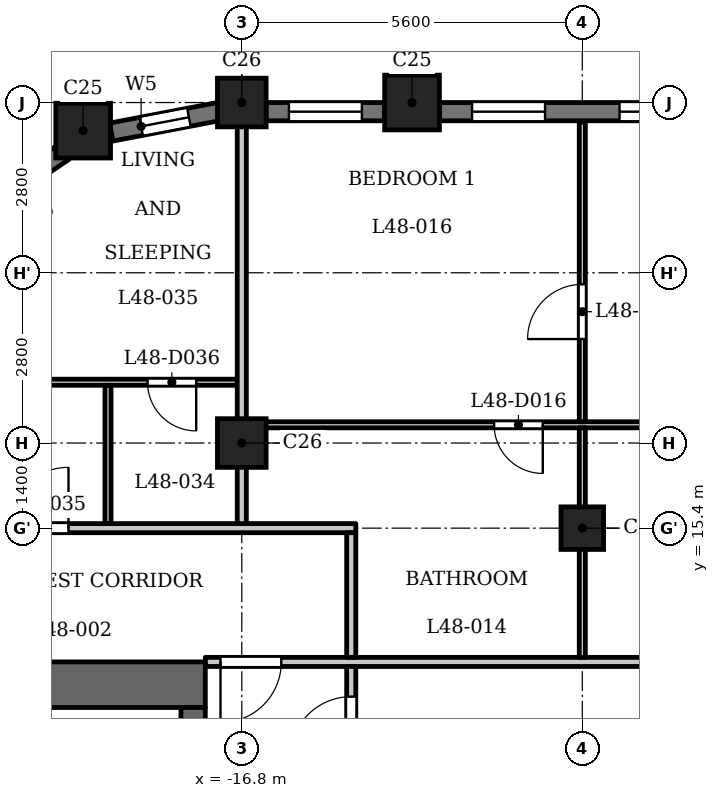
"""IFC4 building model, lengths in metres.
Left out: names, types, materials, properties, quantities, classifications, styles, units other than length and angle.
Written with IfcOpenShell. Run it as: python <this file> out.ifc"""

import sys

from ifc_helpers import new_model, si_unit, direction, frame, frame_2d, origin, origin_2d, place, context, subcontext, project, spatial, rectangle, extrude, element, fill, save


model = new_model("IFC4")
c1 = context("Model", 3, precision=1e-05, world=origin(), true_north=direction((0.0, 1.0)))
c2 = subcontext(c1, "Body", "Model", "MODEL_VIEW")
j1 = project(units=[si_unit("LENGTHUNIT", "METRE"), si_unit("PLANEANGLEUNIT", "RADIAN")], contexts=[c1])
p1 = place(None, origin())
s1 = spatial("IfcSite", under=j1, at=p1, CompositionType="ELEMENT")
p2 = place(p1, origin())
s2 = spatial("IfcBuilding", under=s1, at=p2, CompositionType="ELEMENT")
p3 = place(p2, frame((0.0, 0.0, 188.9)))
s3 = spatial("IfcBuildingStorey", under=s2, at=p3, CompositionType="ELEMENT", Elevation=188.9)
for number, where, z_axis, x_axis in (
    (1, (-14.0, 22.4, 0.0), (0.0, 0.0, 1.0), (1.0, 0.0, 0.0)),
    (2, (-19.409, 21.938, 0.0), (0.0, 0.0, 1.0), (1.0, 0.0, 0.0)),
):
    element("IfcColumn", number, at=place(p3, frame(where, z_axis=z_axis, x_axis=x_axis)), inside=s3, PredefinedType="COLUMN", context=c2, shape_type="SweptSolid", body=[
        extrude(rectangle(XDim=0.9, YDim=0.9, at=origin_2d()), origin(), (0.0, 0.0, 1.0), 3.5),
    ])
for number, where, z_axis, x_axis in (
    (3, (-16.8, 16.8, 0.0), (0.0, 0.0, 1.0), (1.0, 0.0, 0.0)),
    (4, (-16.8, 22.4, 0.0), (0.0, 0.0, 1.0), (1.0, 0.0, 0.0)),
):
    element("IfcColumn", number, at=place(p3, frame(where, z_axis=z_axis, x_axis=x_axis)), inside=s3, PredefinedType="COLUMN", context=c2, shape_type="SweptSolid", body=[
        extrude(rectangle(XDim=0.8, YDim=0.8, at=origin_2d()), origin(), (0.0, 0.0, 1.0), 3.5),
    ])
p4 = place(p3, frame((-11.2, 15.4, 0.0), z_axis=(0.0, 0.0, 1.0), x_axis=(1.0, 0.0, 0.0)))
e5 = element("IfcColumn", 5, at=p4, inside=s3, PredefinedType="COLUMN", context=c2, shape_type="SweptSolid", body=[
    extrude(rectangle(XDim=0.7, YDim=0.7, at=origin_2d()), origin(), (0.0, 0.0, 1.0), 3.5),
])
p5 = place(p3, frame((-8.85, 22.25, 0.0), z_axis=(0.0, 0.0, 1.0), x_axis=(-1.0, 0.0, 0.0)))
e6 = element("IfcWall", 6, at=p5, inside=s3, PredefinedType="SOLIDWALL", context=c2, shape_type="SweptSolid", body=[
    extrude(rectangle(XDim=4.7, YDim=0.3, at=frame_2d((2.35, 0.0))), origin(), (0.0, 0.0, 1.0), 2.5),
])
p6 = place(p5, frame((0.538, 0.0, 0.6)))
e7 = element("IfcOpeningElement", 7, at=p6, cuts=e6, PredefinedType="OPENING", context=c2, shape_type="SweptSolid", body=[
    extrude(rectangle(XDim=1.2, YDim=1.55, at=frame_2d((0.6, 0.775))), frame((0.0, 0.16, 0.0), z_axis=(0.0, -1.0, 0.0), x_axis=(1.0, 0.0, 0.0)), (0.0, 0.0, 1.0), 0.32),
])
p7 = place(p5, frame((2.962, 0.0, 0.6)))
e8 = element("IfcOpeningElement", 8, at=p7, cuts=e6, PredefinedType="OPENING", context=c2, shape_type="SweptSolid", body=[
    extrude(rectangle(XDim=1.2, YDim=1.55, at=frame_2d((0.6, 0.775))), frame((0.0, 0.16, 0.0), z_axis=(0.0, -1.0, 0.0), x_axis=(1.0, 0.0, 0.0)), (0.0, 0.0, 1.0), 0.32),
])
p8 = place(p3, frame((-14.45, 22.25, 0.0), z_axis=(0.0, 0.0, 1.0), x_axis=(-1.0, 0.0, 0.0)))
e9 = element("IfcWall", 9, at=p8, inside=s3, PredefinedType="SOLIDWALL", context=c2, shape_type="SweptSolid", body=[
    extrude(rectangle(XDim=1.95, YDim=0.3, at=frame_2d((0.975, 0.0))), origin(), (0.0, 0.0, 1.0), 2.5),
])
p9 = place(p8, frame((0.375, 0.0, 0.6)))
e10 = element("IfcOpeningElement", 10, at=p9, cuts=e9, PredefinedType="OPENING", context=c2, shape_type="SweptSolid", body=[
    extrude(rectangle(XDim=1.2, YDim=1.55, at=frame_2d((0.6, 0.775))), frame((0.0, 0.16, 0.0), z_axis=(0.0, -1.0, 0.0), x_axis=(1.0, 0.0, 0.0)), (0.0, 0.0, 1.0), 0.32),
])
p10 = place(p3, frame((-17.179, 22.251, 0.0), z_axis=(0.0, 0.0, 1.0), x_axis=(-0.98230529033, -0.187286722942, 0.0)))
e11 = element("IfcWall", 11, at=p10, inside=s3, PredefinedType="SOLIDWALL", context=c2, shape_type="SweptSolid", body=[
    extrude(rectangle(XDim=1.799, YDim=0.3, at=frame_2d((0.899, 0.0))), origin(), (0.0, 0.0, 1.0), 2.5),
])
p11 = place(p10, frame((0.5, 0.0, 0.6)))
e12 = element("IfcOpeningElement", 12, at=p11, cuts=e11, PredefinedType="OPENING", context=c2, shape_type="SweptSolid", body=[
    extrude(rectangle(XDim=0.8, YDim=1.55, at=frame_2d((0.4, 0.775))), frame((0.0, 0.16, 0.0), z_axis=(0.0, -1.0, 0.0), x_axis=(1.0, 0.0, 0.0)), (0.0, 0.0, 1.0), 0.32),
])
p12 = place(p3, frame((-19.719, 21.594, 0.0), z_axis=(0.0, 0.0, 1.0), x_axis=(-0.827067282455, -0.562102935673, 0.0)))
e13 = element("IfcWall", 13, at=p12, inside=s3, PredefinedType="SOLIDWALL", context=c2, shape_type="SweptSolid", body=[
    extrude(rectangle(XDim=1.806, YDim=0.3, at=frame_2d((0.903, 0.0))), origin(), (0.0, 0.0, 1.0), 2.5),
])
p13 = place(p12, frame((0.503, 0.0, 0.6)))
e14 = element("IfcOpeningElement", 14, at=p13, cuts=e13, PredefinedType="OPENING", context=c2, shape_type="SweptSolid", body=[
    extrude(rectangle(XDim=0.8, YDim=1.55, at=frame_2d((0.4, 0.775))), frame((0.0, 0.16, 0.0), z_axis=(0.0, -1.0, 0.0), x_axis=(1.0, 0.0, 0.0)), (0.0, 0.0, 1.0), 0.32),
])
p14 = place(p3, frame((-17.4, 12.825, 0.0), z_axis=(0.0, 0.0, 1.0), x_axis=(-1.0, 0.0, 0.0)))
e15 = element("IfcWall", 15, at=p14, inside=s3, PredefinedType="SHEAR", context=c2, shape_type="SweptSolid", body=[
    extrude(rectangle(XDim=7.6, YDim=0.75, at=frame_2d((3.8, 0.0))), origin(), (0.0, 0.0, 1.0), 3.2),
])
p15 = place(p3, frame((-17.6, -12.45, 0.0), z_axis=(0.0, 0.0, 1.0), x_axis=(0.0, 1.0, 0.0)))
e16 = element("IfcWall", 16, at=p15, inside=s3, PredefinedType="SHEAR", context=c2, shape_type="SweptSolid", body=[
    extrude(rectangle(XDim=24.9, YDim=0.4, at=frame_2d((12.45, 0.0))), origin(), (0.0, 0.0, 1.0), 3.2),
])
p16 = place(p15, frame((6.325, 0.0, 0.0)))
e17 = element("IfcOpeningElement", 17, at=p16, cuts=e16, PredefinedType="OPENING", context=c2, shape_type="SweptSolid", body=[
    extrude(rectangle(XDim=0.9, YDim=2.1, at=frame_2d((0.45, 1.05))), frame((0.0, 0.21, 0.0), z_axis=(0.0, -1.0, 0.0), x_axis=(1.0, 0.0, 0.0)), (0.0, 0.0, 1.0), 0.42),
])
p17 = place(p15, frame((9.925, 0.0, 0.0)))
e18 = element("IfcOpeningElement", 18, at=p17, cuts=e16, PredefinedType="OPENING", context=c2, shape_type="SweptSolid", body=[
    extrude(rectangle(XDim=0.9, YDim=2.1, at=frame_2d((0.45, 1.05))), frame((0.0, 0.21, 0.0), z_axis=(0.0, -1.0, 0.0), x_axis=(1.0, 0.0, 0.0)), (0.0, 0.0, 1.0), 0.42),
])
p18 = place(p15, frame((15.6, 0.0, 0.0)))
e19 = element("IfcOpeningElement", 19, at=p18, cuts=e16, PredefinedType="OPENING", context=c2, shape_type="SweptSolid", body=[
    extrude(rectangle(XDim=1.1, YDim=2.1, at=frame_2d((0.55, 1.05))), frame((0.0, 0.21, 0.0), z_axis=(0.0, -1.0, 0.0), x_axis=(1.0, 0.0, 0.0)), (0.0, 0.0, 1.0), 0.42),
])
p19 = place(p15, frame((18.0, 0.0, 0.0)))
e20 = element("IfcOpeningElement", 20, at=p19, cuts=e16, PredefinedType="OPENING", context=c2, shape_type="SweptSolid", body=[
    extrude(rectangle(XDim=1.1, YDim=2.1, at=frame_2d((0.55, 1.05))), frame((0.0, 0.21, 0.0), z_axis=(0.0, -1.0, 0.0), x_axis=(1.0, 0.0, 0.0)), (0.0, 0.0, 1.0), 0.42),
])
p20 = place(p15, frame((23.025, 0.0, 0.0)))
e21 = element("IfcOpeningElement", 21, at=p20, cuts=e16, PredefinedType="OPENING", context=c2, shape_type="SweptSolid", body=[
    extrude(rectangle(XDim=1.1, YDim=2.1, at=frame_2d((0.55, 1.05))), frame((0.0, 0.21, 0.0), z_axis=(0.0, -1.0, 0.0), x_axis=(1.0, 0.0, 0.0)), (0.0, 0.0, 1.0), 0.42),
])
p21 = place(p15, frame((0.775, 0.0, 0.0)))
e22 = element("IfcOpeningElement", 22, at=p21, cuts=e16, PredefinedType="OPENING", context=c2, shape_type="SweptSolid", body=[
    extrude(rectangle(XDim=1.1, YDim=2.1, at=frame_2d((0.55, 1.05))), frame((0.0, 0.21, 0.0), z_axis=(0.0, -1.0, 0.0), x_axis=(1.0, 0.0, 0.0)), (0.0, 0.0, 1.0), 0.42),
])
p22 = place(p15, frame((12.925, 0.0, 0.0)))
e23 = element("IfcOpeningElement", 23, at=p22, cuts=e16, PredefinedType="OPENING", context=c2, shape_type="SweptSolid", body=[
    extrude(rectangle(XDim=1.8, YDim=2.1, at=frame_2d((0.9, 1.05))), frame((0.0, 0.21, 0.0), z_axis=(0.0, -1.0, 0.0), x_axis=(1.0, 0.0, 0.0)), (0.0, 0.0, 1.0), 0.42),
])
p23 = place(p3, frame((-17.4, 13.2, 0.0), z_axis=(0.0, 0.0, 1.0), x_axis=(1.0, 0.0, 0.0)))
e24 = element("IfcWall", 24, at=p23, inside=s3, PredefinedType="PARTITIONING", context=c2, shape_type="SweptSolid", body=[
    extrude(rectangle(XDim=34.8, YDim=0.15, at=frame_2d((17.4, 0.0))), origin(), (0.0, 0.0, 1.0), 3.2),
])
p24 = place(p23, frame((0.25, 0.0, 0.0)))
e25 = element("IfcOpeningElement", 25, at=p24, cuts=e24, PredefinedType="OPENING", context=c2, shape_type="SweptSolid", body=[
    extrude(rectangle(XDim=1.0, YDim=2.1, at=frame_2d((0.5, 1.05))), frame((0.0, 0.085, 0.0), z_axis=(0.0, -1.0, 0.0), x_axis=(1.0, 0.0, 0.0)), (0.0, 0.0, 1.0), 0.17),
])
p25 = place(p23, frame((33.65, 0.0, 0.0)))
e26 = element("IfcOpeningElement", 26, at=p25, cuts=e24, PredefinedType="OPENING", context=c2, shape_type="SweptSolid", body=[
    extrude(rectangle(XDim=1.0, YDim=2.1, at=frame_2d((0.5, 1.05))), frame((0.0, 0.085, 0.0), z_axis=(0.0, -1.0, 0.0), x_axis=(1.0, 0.0, 0.0)), (0.0, 0.0, 1.0), 0.17),
])
p26 = place(p23, frame((10.15, 0.0, 0.0)))
e27 = element("IfcOpeningElement", 27, at=p26, cuts=e24, PredefinedType="OPENING", context=c2, shape_type="SweptSolid", body=[
    extrude(rectangle(XDim=1.0, YDim=2.1, at=frame_2d((0.5, 1.05))), frame((0.0, 0.085, 0.0), z_axis=(0.0, -1.0, 0.0), x_axis=(1.0, 0.0, 0.0)), (0.0, 0.0, 1.0), 0.17),
])
p27 = place(p23, frame((13.55, 0.0, 0.0)))
e28 = element("IfcOpeningElement", 28, at=p27, cuts=e24, PredefinedType="OPENING", context=c2, shape_type="SweptSolid", body=[
    extrude(rectangle(XDim=1.0, YDim=2.1, at=frame_2d((0.5, 1.05))), frame((0.0, 0.085, 0.0), z_axis=(0.0, -1.0, 0.0), x_axis=(1.0, 0.0, 0.0)), (0.0, 0.0, 1.0), 0.17),
])
p28 = place(p23, frame((20.85, 0.0, 0.0)))
e29 = element("IfcOpeningElement", 29, at=p28, cuts=e24, PredefinedType="OPENING", context=c2, shape_type="SweptSolid", body=[
    extrude(rectangle(XDim=1.0, YDim=2.1, at=frame_2d((0.5, 1.05))), frame((0.0, 0.085, 0.0), z_axis=(0.0, -1.0, 0.0), x_axis=(1.0, 0.0, 0.0)), (0.0, 0.0, 1.0), 0.17),
])
p29 = place(p23, frame((23.7, 0.0, 0.0)))
e30 = element("IfcOpeningElement", 30, at=p29, cuts=e24, PredefinedType="OPENING", context=c2, shape_type="SweptSolid", body=[
    extrude(rectangle(XDim=1.0, YDim=2.1, at=frame_2d((0.5, 1.05))), frame((0.0, 0.085, 0.0), z_axis=(0.0, -1.0, 0.0), x_axis=(1.0, 0.0, 0.0)), (0.0, 0.0, 1.0), 0.17),
])
p30 = place(p3, frame((-24.684, 15.4, 0.0), z_axis=(0.0, 0.0, 1.0), x_axis=(1.0, 0.0, 0.0)))
e31 = element("IfcWall", 31, at=p30, inside=s3, PredefinedType="PARTITIONING", context=c2, shape_type="SweptSolid", body=[
    extrude(rectangle(XDim=9.759, YDim=0.15, at=frame_2d((4.879, 0.0))), origin(), (0.0, 0.0, 1.0), 3.2),
])
p31 = place(p30, frame((4.034, 0.0, 0.0)))
e32 = element("IfcOpeningElement", 32, at=p31, cuts=e31, PredefinedType="OPENING", context=c2, shape_type="SweptSolid", body=[
    extrude(rectangle(XDim=1.0, YDim=2.1, at=frame_2d((0.5, 1.05))), frame((0.0, 0.085, 0.0), z_axis=(0.0, -1.0, 0.0), x_axis=(1.0, 0.0, 0.0)), (0.0, 0.0, 1.0), 0.17),
])
p32 = place(p3, frame((-16.725, 17.1, 0.0), z_axis=(0.0, 0.0, 1.0), x_axis=(1.0, 0.0, 0.0)))
e33 = element("IfcWall", 33, at=p32, inside=s3, PredefinedType="PARTITIONING", context=c2, shape_type="SweptSolid", body=[
    extrude(rectangle(XDim=33.45, YDim=0.1, at=frame_2d((16.725, 0.0))), origin(), (0.0, 0.0, 1.0), 3.2),
])
p33 = place(p32, frame((4.075, 0.0, 0.0)))
e34 = element("IfcOpeningElement", 34, at=p33, cuts=e33, PredefinedType="OPENING", context=c2, shape_type="SweptSolid", body=[
    extrude(rectangle(XDim=0.8, YDim=2.1, at=frame_2d((0.4, 1.05))), frame((0.0, 0.06, 0.0), z_axis=(0.0, -1.0, 0.0), x_axis=(1.0, 0.0, 0.0)), (0.0, 0.0, 1.0), 0.12),
])
p34 = place(p32, frame((9.575, 0.0, 0.0)))
e35 = element("IfcOpeningElement", 35, at=p34, cuts=e33, PredefinedType="OPENING", context=c2, shape_type="SweptSolid", body=[
    extrude(rectangle(XDim=0.9, YDim=2.1, at=frame_2d((0.45, 1.05))), frame((0.0, 0.06, 0.0), z_axis=(0.0, -1.0, 0.0), x_axis=(1.0, 0.0, 0.0)), (0.0, 0.0, 1.0), 0.12),
])
p35 = place(p32, frame((15.175, 0.0, 0.0)))
e36 = element("IfcOpeningElement", 36, at=p35, cuts=e33, PredefinedType="OPENING", context=c2, shape_type="SweptSolid", body=[
    extrude(rectangle(XDim=0.8, YDim=2.1, at=frame_2d((0.4, 1.05))), frame((0.0, 0.06, 0.0), z_axis=(0.0, -1.0, 0.0), x_axis=(1.0, 0.0, 0.0)), (0.0, 0.0, 1.0), 0.12),
])
p36 = place(p32, frame((12.975, 0.0, 0.0)))
e37 = element("IfcOpeningElement", 37, at=p36, cuts=e33, PredefinedType="OPENING", context=c2, shape_type="SweptSolid", body=[
    extrude(rectangle(XDim=0.9, YDim=2.1, at=frame_2d((0.45, 1.05))), frame((0.0, 0.06, 0.0), z_axis=(0.0, -1.0, 0.0), x_axis=(1.0, 0.0, 0.0)), (0.0, 0.0, 1.0), 0.12),
])
p37 = place(p32, frame((17.625, 0.0, 0.0)))
e38 = element("IfcOpeningElement", 38, at=p37, cuts=e33, PredefinedType="OPENING", context=c2, shape_type="SweptSolid", body=[
    extrude(rectangle(XDim=0.8, YDim=2.1, at=frame_2d((0.4, 1.05))), frame((0.0, 0.06, 0.0), z_axis=(0.0, -1.0, 0.0), x_axis=(1.0, 0.0, 0.0)), (0.0, 0.0, 1.0), 0.12),
])
p38 = place(p32, frame((20.025, 0.0, 0.0)))
e39 = element("IfcOpeningElement", 39, at=p38, cuts=e33, PredefinedType="OPENING", context=c2, shape_type="SweptSolid", body=[
    extrude(rectangle(XDim=0.9, YDim=2.1, at=frame_2d((0.45, 1.05))), frame((0.0, 0.06, 0.0), z_axis=(0.0, -1.0, 0.0), x_axis=(1.0, 0.0, 0.0)), (0.0, 0.0, 1.0), 0.12),
])
p39 = place(p32, frame((31.975, 0.0, 0.0)))
e40 = element("IfcOpeningElement", 40, at=p39, cuts=e33, PredefinedType="OPENING", context=c2, shape_type="SweptSolid", body=[
    extrude(rectangle(XDim=0.8, YDim=2.1, at=frame_2d((0.4, 1.05))), frame((0.0, 0.06, 0.0), z_axis=(0.0, -1.0, 0.0), x_axis=(1.0, 0.0, 0.0)), (0.0, 0.0, 1.0), 0.12),
])
p40 = place(p32, frame((29.775, 0.0, 0.0)))
e41 = element("IfcOpeningElement", 41, at=p40, cuts=e33, PredefinedType="OPENING", context=c2, shape_type="SweptSolid", body=[
    extrude(rectangle(XDim=0.9, YDim=2.1, at=frame_2d((0.45, 1.05))), frame((0.0, 0.06, 0.0), z_axis=(0.0, -1.0, 0.0), x_axis=(1.0, 0.0, 0.0)), (0.0, 0.0, 1.0), 0.12),
])
p41 = place(p32, frame((23.025, 0.0, 0.0)))
e42 = element("IfcOpeningElement", 42, at=p41, cuts=e33, PredefinedType="OPENING", context=c2, shape_type="SweptSolid", body=[
    extrude(rectangle(XDim=0.9, YDim=2.1, at=frame_2d((0.45, 1.05))), frame((0.0, 0.06, 0.0), z_axis=(0.0, -1.0, 0.0), x_axis=(1.0, 0.0, 0.0)), (0.0, 0.0, 1.0), 0.12),
])
p42 = place(p32, frame((26.125, 0.0, 0.0)))
e43 = element("IfcOpeningElement", 43, at=p42, cuts=e33, PredefinedType="OPENING", context=c2, shape_type="SweptSolid", body=[
    extrude(rectangle(XDim=0.9, YDim=2.1, at=frame_2d((0.45, 1.05))), frame((0.0, 0.06, 0.0), z_axis=(0.0, -1.0, 0.0), x_axis=(1.0, 0.0, 0.0)), (0.0, 0.0, 1.0), 0.12),
])
p43 = place(p3, frame((-23.594, 17.8, 0.0), z_axis=(0.0, 0.0, 1.0), x_axis=(1.0, 0.0, 0.0)))
e44 = element("IfcWall", 44, at=p43, inside=s3, PredefinedType="PARTITIONING", context=c2, shape_type="SweptSolid", body=[
    extrude(rectangle(XDim=6.719, YDim=0.1, at=frame_2d((3.359, 0.0))), origin(), (0.0, 0.0, 1.0), 3.2),
])
p44 = place(p43, frame((5.244, 0.0, 0.0)))
e45 = element("IfcOpeningElement", 45, at=p44, cuts=e44, PredefinedType="OPENING", context=c2, shape_type="SweptSolid", body=[
    extrude(rectangle(XDim=0.8, YDim=2.1, at=frame_2d((0.4, 1.05))), frame((0.0, 0.06, 0.0), z_axis=(0.0, -1.0, 0.0), x_axis=(1.0, 0.0, 0.0)), (0.0, 0.0, 1.0), 0.12),
])
p45 = place(p43, frame((2.044, 0.0, 0.0)))
e46 = element("IfcOpeningElement", 46, at=p45, cuts=e44, PredefinedType="OPENING", context=c2, shape_type="SweptSolid", body=[
    extrude(rectangle(XDim=0.9, YDim=2.1, at=frame_2d((0.45, 1.05))), frame((0.0, 0.06, 0.0), z_axis=(0.0, -1.0, 0.0), x_axis=(1.0, 0.0, 0.0)), (0.0, 0.0, 1.0), 0.12),
])
p46 = place(p3, frame((-19.0, 15.475, 0.0), z_axis=(0.0, 0.0, 1.0), x_axis=(0.0, 1.0, 0.0)))
e47 = element("IfcWall", 47, at=p46, inside=s3, PredefinedType="PARTITIONING", context=c2, shape_type="SweptSolid", body=[
    extrude(rectangle(XDim=2.275, YDim=0.1, at=frame_2d((1.137, 0.0))), origin(), (0.0, 0.0, 1.0), 3.2),
])
p47 = place(p3, frame((-16.8, 15.475, 0.0), z_axis=(0.0, 0.0, 1.0), x_axis=(0.0, 1.0, 0.0)))
e48 = element("IfcWall", 48, at=p47, inside=s3, PredefinedType="PARTITIONING", context=c2, shape_type="SweptSolid", body=[
    extrude(rectangle(XDim=6.835, YDim=0.15, at=frame_2d((3.417, 0.0))), origin(), (0.0, 0.0, 1.0), 2.55),
])
p48 = place(p3, frame((-15.0, 6.769, 0.0), z_axis=(0.0, 0.0, 1.0), x_axis=(0.0, 1.0, 0.0)))
e49 = element("IfcWall", 49, at=p48, inside=s3, PredefinedType="PARTITIONING", context=c2, shape_type="SweptSolid", body=[
    extrude(rectangle(XDim=6.356, YDim=0.15, at=frame_2d((3.178, 0.0))), origin(), (0.0, 0.0, 1.0), 3.2),
])
p49 = place(p48, frame((4.86, 0.0, 0.0)))
e50 = element("IfcOpeningElement", 50, at=p49, cuts=e49, PredefinedType="OPENING", context=c2, shape_type="SweptSolid", body=[
    extrude(rectangle(XDim=1.0, YDim=2.1, at=frame_2d((0.5, 1.05))), frame((0.0, 0.085, 0.0), z_axis=(0.0, -1.0, 0.0), x_axis=(1.0, 0.0, 0.0)), (0.0, 0.0, 1.0), 0.17),
])
p50 = place(p3, frame((-15.0, 13.275, 0.0), z_axis=(0.0, 0.0, 1.0), x_axis=(0.0, 1.0, 0.0)))
e51 = element("IfcWall", 51, at=p50, inside=s3, PredefinedType="PARTITIONING", context=c2, shape_type="SweptSolid", body=[
    extrude(rectangle(XDim=2.05, YDim=0.15, at=frame_2d((1.025, 0.0))), origin(), (0.0, 0.0, 1.0), 3.2),
])
p51 = place(p3, frame((-11.2, 13.275, 0.0), z_axis=(0.0, 0.0, 1.0), x_axis=(0.0, 1.0, 0.0)))
e52 = element("IfcWall", 52, at=p51, inside=s3, PredefinedType="PARTITIONING", context=c2, shape_type="SweptSolid", body=[
    extrude(rectangle(XDim=3.775, YDim=0.1, at=frame_2d((1.888, 0.0))), origin(), (0.0, 0.0, 1.0), 3.2),
])
p52 = place(p3, frame((-11.2, 17.15, 0.0), z_axis=(0.0, 0.0, 1.0), x_axis=(0.0, 1.0, 0.0)))
e53 = element("IfcWall", 53, at=p52, inside=s3, PredefinedType="PARTITIONING", context=c2, shape_type="SweptSolid", body=[
    extrude(rectangle(XDim=4.93, YDim=0.1, at=frame_2d((2.465, 0.0))), origin(), (0.0, 0.0, 1.0), 3.2),
])
p53 = place(p52, frame((1.36, 0.0, 0.0)))
e54 = element("IfcOpeningElement", 54, at=p53, cuts=e53, PredefinedType="OPENING", context=c2, shape_type="SweptSolid", body=[
    extrude(rectangle(XDim=0.9, YDim=2.1, at=frame_2d((0.45, 1.05))), frame((0.0, 0.06, 0.0), z_axis=(0.0, -1.0, 0.0), x_axis=(1.0, 0.0, 0.0)), (0.0, 0.0, 1.0), 0.12),
])
p54 = place(p49, origin())
e55 = element("IfcDoor", 55, at=p54, inside=s3, OperationType="SINGLE_SWING_RIGHT", PredefinedType="DOOR", context=c2, shape_type="SweptSolid", body=[
    extrude(rectangle(XDim=1.0, YDim=2.1, at=frame_2d((0.5, 1.05))), frame((0.0, 0.025, 0.0), z_axis=(0.0, -1.0, 0.0), x_axis=(1.0, 0.0, 0.0)), (0.0, 0.0, 1.0), 0.05),
])
fill(e50, e55)
p55 = place(p24, origin())
e56 = element("IfcDoor", 56, at=p55, inside=s3, OperationType="SINGLE_SWING_LEFT", PredefinedType="DOOR", context=c2, shape_type="SweptSolid", body=[
    extrude(rectangle(XDim=1.0, YDim=2.1, at=frame_2d((0.5, 1.05))), frame((0.0, 0.025, 0.0), z_axis=(0.0, -1.0, 0.0), x_axis=(1.0, 0.0, 0.0)), (0.0, 0.0, 1.0), 0.05),
])
fill(e25, e56)
p56 = place(p33, origin())
e57 = element("IfcDoor", 57, at=p56, inside=s3, OperationType="SINGLE_SWING_RIGHT", PredefinedType="DOOR", context=c2, shape_type="SweptSolid", body=[
    extrude(rectangle(XDim=0.8, YDim=2.1, at=frame_2d((0.4, 1.05))), frame((0.0, 0.025, 0.0), z_axis=(0.0, -1.0, 0.0), x_axis=(1.0, 0.0, 0.0)), (0.0, 0.0, 1.0), 0.05),
])
fill(e34, e57)
p57 = place(p53, origin())
e58 = element("IfcDoor", 58, at=p57, inside=s3, OperationType="SINGLE_SWING_RIGHT", PredefinedType="DOOR", context=c2, shape_type="SweptSolid", body=[
    extrude(rectangle(XDim=0.9, YDim=2.1, at=frame_2d((0.45, 1.05))), frame((0.0, 0.025, 0.0), z_axis=(0.0, -1.0, 0.0), x_axis=(1.0, 0.0, 0.0)), (0.0, 0.0, 1.0), 0.05),
])
fill(e54, e58)
p58 = place(p31, origin())
e59 = element("IfcDoor", 59, at=p58, inside=s3, OperationType="SINGLE_SWING_LEFT", PredefinedType="DOOR", context=c2, shape_type="SweptSolid", body=[
    extrude(rectangle(XDim=1.0, YDim=2.1, at=frame_2d((0.5, 1.05))), frame((0.0, 0.025, 0.0), z_axis=(0.0, -1.0, 0.0), x_axis=(1.0, 0.0, 0.0)), (0.0, 0.0, 1.0), 0.05),
])
fill(e32, e59)
p59 = place(p44, origin())
e60 = element("IfcDoor", 60, at=p59, inside=s3, OperationType="SINGLE_SWING_RIGHT", PredefinedType="DOOR", context=c2, shape_type="SweptSolid", body=[
    extrude(rectangle(XDim=0.8, YDim=2.1, at=frame_2d((0.4, 1.05))), frame((0.0, 0.025, 0.0), z_axis=(0.0, -1.0, 0.0), x_axis=(1.0, 0.0, 0.0)), (0.0, 0.0, 1.0), 0.05),
])
fill(e45, e60)
p60 = place(p6, origin())
e61 = element("IfcWindow", 61, at=p60, inside=s3, PartitioningType="SINGLE_PANEL", PredefinedType="WINDOW", context=c2, shape_type="SweptSolid", body=[
    extrude(rectangle(XDim=1.2, YDim=1.55, at=frame_2d((0.6, 0.775))), frame((0.0, 0.03, 0.0), z_axis=(0.0, -1.0, 0.0), x_axis=(1.0, 0.0, 0.0)), (0.0, 0.0, 1.0), 0.06),
])
fill(e7, e61)
p61 = place(p7, origin())
e62 = element("IfcWindow", 62, at=p61, inside=s3, PartitioningType="SINGLE_PANEL", PredefinedType="WINDOW", context=c2, shape_type="SweptSolid", body=[
    extrude(rectangle(XDim=1.2, YDim=1.55, at=frame_2d((0.6, 0.775))), frame((0.0, 0.03, 0.0), z_axis=(0.0, -1.0, 0.0), x_axis=(1.0, 0.0, 0.0)), (0.0, 0.0, 1.0), 0.06),
])
fill(e8, e62)
p62 = place(p9, origin())
e63 = element("IfcWindow", 63, at=p62, inside=s3, PartitioningType="SINGLE_PANEL", PredefinedType="WINDOW", context=c2, shape_type="SweptSolid", body=[
    extrude(rectangle(XDim=1.2, YDim=1.55, at=frame_2d((0.6, 0.775))), frame((0.0, 0.03, 0.0), z_axis=(0.0, -1.0, 0.0), x_axis=(1.0, 0.0, 0.0)), (0.0, 0.0, 1.0), 0.06),
])
fill(e10, e63)
p63 = place(p11, origin())
e64 = element("IfcWindow", 64, at=p63, inside=s3, PartitioningType="SINGLE_PANEL", PredefinedType="WINDOW", context=c2, shape_type="SweptSolid", body=[
    extrude(rectangle(XDim=0.8, YDim=1.55, at=frame_2d((0.4, 0.775))), frame((0.0, 0.03, 0.0), z_axis=(0.0, -1.0, 0.0), x_axis=(1.0, 0.0, 0.0)), (0.0, 0.0, 1.0), 0.06),
])
fill(e12, e64)
save(model, sys.argv[1])
